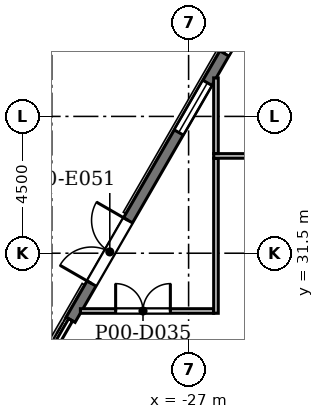
"""IFC4 building model, lengths in metres.
Left out: names, types, materials, properties, quantities, classifications, styles, units other than length and angle.
Written with IfcOpenShell. Run it as: python <this file> out.ifc"""

import sys

from ifc_helpers import new_model, si_unit, direction, frame, frame_2d, origin, place, context, subcontext, project, spatial, rectangle, extrude, element, fill, save


model = new_model("IFC4")
c1 = context("Model", 3, precision=1e-05, world=origin(), true_north=direction((0.0, 1.0)))
c2 = subcontext(c1, "Body", "Model", "MODEL_VIEW")
j1 = project(units=[si_unit("LENGTHUNIT", "METRE"), si_unit("PLANEANGLEUNIT", "RADIAN")], contexts=[c1])
p1 = place(None, origin())
s1 = spatial("IfcSite", under=j1, at=p1, CompositionType="ELEMENT")
p2 = place(p1, origin())
s2 = spatial("IfcBuilding", under=s1, at=p2, CompositionType="ELEMENT")
p3 = place(p2, origin())
s3 = spatial("IfcBuildingStorey", under=s2, at=p3, CompositionType="ELEMENT", Elevation=0.0)
p4 = place(p3, frame((-4.853, 74.393, 0.0), z_axis=(0.0, 0.0, 1.0), x_axis=(-0.499999725439, -0.866025562302, 0.0)))
e1 = element("IfcWall", 1, at=p4, inside=s3, PredefinedType="SOLIDWALL", context=c2, shape_type="SweptSolid", body=[
    extrude(rectangle(XDim=52.058, YDim=0.34, at=frame_2d((26.029, 0.0))), origin(), (0.0, 0.0, 1.0), 7.7),
])
p5 = place(p4, frame((19.058, 0.0, 0.9)))
e2 = element("IfcOpeningElement", 2, at=p5, cuts=e1, PredefinedType="OPENING", context=c2, shape_type="SweptSolid", body=[
    extrude(rectangle(XDim=1.885, YDim=3.5, at=frame_2d((0.942, 1.75))), frame((0.0, 0.18, 0.0), z_axis=(0.0, -1.0, 0.0), x_axis=(1.0, 0.0, 0.0)), (0.0, 0.0, 1.0), 0.36),
])
p6 = place(p4, frame((22.058, 0.0, 0.9)))
e3 = element("IfcOpeningElement", 3, at=p6, cuts=e1, PredefinedType="OPENING", context=c2, shape_type="SweptSolid", body=[
    extrude(rectangle(XDim=1.885, YDim=3.5, at=frame_2d((0.942, 1.75))), frame((0.0, 0.18, 0.0), z_axis=(0.0, -1.0, 0.0), x_axis=(1.0, 0.0, 0.0)), (0.0, 0.0, 1.0), 0.36),
])
p7 = place(p4, frame((40.058, 0.0, 0.9)))
e4 = element("IfcOpeningElement", 4, at=p7, cuts=e1, PredefinedType="OPENING", context=c2, shape_type="SweptSolid", body=[
    extrude(rectangle(XDim=1.885, YDim=3.5, at=frame_2d((0.942, 1.75))), frame((0.0, 0.18, 0.0), z_axis=(0.0, -1.0, 0.0), x_axis=(1.0, 0.0, 0.0)), (0.0, 0.0, 1.0), 0.36),
])
p8 = place(p4, frame((43.058, 0.0, 0.9)))
e5 = element("IfcOpeningElement", 5, at=p8, cuts=e1, PredefinedType="OPENING", context=c2, shape_type="SweptSolid", body=[
    extrude(rectangle(XDim=1.885, YDim=3.5, at=frame_2d((0.942, 1.75))), frame((0.0, 0.18, 0.0), z_axis=(0.0, -1.0, 0.0), x_axis=(1.0, 0.0, 0.0)), (0.0, 0.0, 1.0), 0.36),
])
p9 = place(p4, frame((48.279, 0.0, 0.0)))
e6 = element("IfcOpeningElement", 6, at=p9, cuts=e1, PredefinedType="OPENING", context=c2, shape_type="SweptSolid", body=[
    extrude(rectangle(XDim=2.4, YDim=2.7, at=frame_2d((1.2, 1.35))), frame((0.0, 0.18, 0.0), z_axis=(0.0, -1.0, 0.0), x_axis=(1.0, 0.0, 0.0)), (0.0, 0.0, 1.0), 0.36),
])
p10 = place(p4, frame((36.8, 0.0, 0.0)))
e7 = element("IfcOpeningElement", 7, at=p10, cuts=e1, PredefinedType="OPENING", context=c2, shape_type="SweptSolid", body=[
    extrude(rectangle(XDim=2.4, YDim=2.7, at=frame_2d((1.2, 1.35))), frame((0.0, 0.18, 0.0), z_axis=(0.0, -1.0, 0.0), x_axis=(1.0, 0.0, 0.0)), (0.0, 0.0, 1.0), 0.36),
])
p11 = place(p4, frame((31.06, 0.0, 0.0)))
e8 = element("IfcOpeningElement", 8, at=p11, cuts=e1, PredefinedType="OPENING", context=c2, shape_type="SweptSolid", body=[
    extrude(rectangle(XDim=2.4, YDim=2.7, at=frame_2d((1.2, 1.35))), frame((0.0, 0.18, 0.0), z_axis=(0.0, -1.0, 0.0), x_axis=(1.0, 0.0, 0.0)), (0.0, 0.0, 1.0), 0.36),
])
p12 = place(p4, frame((25.321, 0.0, 0.0)))
e9 = element("IfcOpeningElement", 9, at=p12, cuts=e1, PredefinedType="OPENING", context=c2, shape_type="SweptSolid", body=[
    extrude(rectangle(XDim=2.4, YDim=2.7, at=frame_2d((1.2, 1.35))), frame((0.0, 0.18, 0.0), z_axis=(0.0, -1.0, 0.0), x_axis=(1.0, 0.0, 0.0)), (0.0, 0.0, 1.0), 0.36),
])
p13 = place(p4, frame((13.842, 0.0, 0.0)))
e10 = element("IfcOpeningElement", 10, at=p13, cuts=e1, PredefinedType="OPENING", context=c2, shape_type="SweptSolid", body=[
    extrude(rectangle(XDim=2.4, YDim=2.7, at=frame_2d((1.2, 1.35))), frame((0.0, 0.18, 0.0), z_axis=(0.0, -1.0, 0.0), x_axis=(1.0, 0.0, 0.0)), (0.0, 0.0, 1.0), 0.36),
])
p14 = place(p4, frame((8.102, 0.0, 0.0)))
e11 = element("IfcOpeningElement", 11, at=p14, cuts=e1, PredefinedType="OPENING", context=c2, shape_type="SweptSolid", body=[
    extrude(rectangle(XDim=2.4, YDim=2.7, at=frame_2d((1.2, 1.35))), frame((0.0, 0.18, 0.0), z_axis=(0.0, -1.0, 0.0), x_axis=(1.0, 0.0, 0.0)), (0.0, 0.0, 1.0), 0.36),
])
p15 = place(p4, frame((2.363, 0.0, 0.0)))
e12 = element("IfcOpeningElement", 12, at=p15, cuts=e1, PredefinedType="OPENING", context=c2, shape_type="SweptSolid", body=[
    extrude(rectangle(XDim=2.4, YDim=2.7, at=frame_2d((1.2, 1.35))), frame((0.0, 0.18, 0.0), z_axis=(0.0, -1.0, 0.0), x_axis=(1.0, 0.0, 0.0)), (0.0, 0.0, 1.0), 0.36),
])
p16 = place(p3, frame((-26.175, 29.6, 0.0), z_axis=(0.0, 0.0, 1.0), x_axis=(-1.0, 0.0, 0.0)))
e13 = element("IfcWall", 13, at=p16, inside=s3, PredefinedType="PARTITIONING", context=c2, shape_type="SweptSolid", body=[
    extrude(rectangle(XDim=4.383, YDim=0.15, at=frame_2d((2.191, 0.0))), origin(), (0.0, 0.0, 1.0), 7.7),
])
p17 = place(p16, frame((1.425, 0.0, 0.0)))
e14 = element("IfcOpeningElement", 14, at=p17, cuts=e13, PredefinedType="OPENING", context=c2, shape_type="SweptSolid", body=[
    extrude(rectangle(XDim=1.8, YDim=2.1, at=frame_2d((0.9, 1.05))), frame((0.0, 0.085, 0.0), z_axis=(0.0, -1.0, 0.0), x_axis=(1.0, 0.0, 0.0)), (0.0, 0.0, 1.0), 0.17),
])
p18 = place(p3, frame((-26.1, 34.625, 0.0), z_axis=(0.0, 0.0, 1.0), x_axis=(0.0, -1.0, 0.0)))
e15 = element("IfcWall", 15, at=p18, inside=s3, PredefinedType="PARTITIONING", context=c2, shape_type="SweptSolid", body=[
    extrude(rectangle(XDim=5.1, YDim=0.15, at=frame_2d((2.55, 0.0))), origin(), (0.0, 0.0, 1.0), 7.7),
])
p19 = place(p3, frame((-16.075, 34.7, 0.0), z_axis=(0.0, 0.0, 1.0), x_axis=(-1.0, 0.0, 0.0)))
e16 = element("IfcWall", 16, at=p19, inside=s3, PredefinedType="PARTITIONING", context=c2, shape_type="SweptSolid", body=[
    extrude(rectangle(XDim=10.1, YDim=0.15, at=frame_2d((5.05, 0.0))), origin(), (0.0, 0.0, 1.0), 7.7),
])
p20 = place(p19, frame((3.025, 0.0, 0.0)))
e17 = element("IfcOpeningElement", 17, at=p20, cuts=e16, PredefinedType="OPENING", context=c2, shape_type="SweptSolid", body=[
    extrude(rectangle(XDim=1.8, YDim=2.1, at=frame_2d((0.9, 1.05))), frame((0.0, 0.085, 0.0), z_axis=(0.0, -1.0, 0.0), x_axis=(1.0, 0.0, 0.0)), (0.0, 0.0, 1.0), 0.17),
])
p21 = place(p3, frame((-26.1, 37.267, 0.0), z_axis=(0.0, 0.0, 1.0), x_axis=(0.0, -1.0, 0.0)))
e18 = element("IfcWall", 18, at=p21, inside=s3, PredefinedType="PARTITIONING", context=c2, shape_type="SweptSolid", body=[
    extrude(rectangle(XDim=2.492, YDim=0.15, at=frame_2d((1.246, 0.0))), origin(), (0.0, 0.0, 1.0), 7.7),
])
p22 = place(p7, origin())
e19 = element("IfcWindow", 19, at=p22, inside=s3, PartitioningType="SINGLE_PANEL", PredefinedType="WINDOW", context=c2, shape_type="SweptSolid", body=[
    extrude(rectangle(XDim=1.885, YDim=3.5, at=frame_2d((0.942, 1.75))), frame((0.0, 0.11, 0.0), z_axis=(0.0, -1.0, 0.0), x_axis=(1.0, 0.0, 0.0)), (0.0, 0.0, 1.0), 0.06),
])
fill(e4, e19)
p23 = place(p8, origin())
e20 = element("IfcWindow", 20, at=p23, inside=s3, PartitioningType="SINGLE_PANEL", PredefinedType="WINDOW", context=c2, shape_type="SweptSolid", body=[
    extrude(rectangle(XDim=1.885, YDim=3.5, at=frame_2d((0.942, 1.75))), frame((0.0, 0.11, 0.0), z_axis=(0.0, -1.0, 0.0), x_axis=(1.0, 0.0, 0.0)), (0.0, 0.0, 1.0), 0.06),
])
fill(e5, e20)
p24 = place(p9, frame((2.4, 0.0, 0.0), z_axis=(0.0, 0.0, 1.0), x_axis=(-1.0, 0.0, 0.0)))
e21 = element("IfcDoor", 21, at=p24, inside=s3, OperationType="DOUBLE_DOOR_SINGLE_SWING", PredefinedType="DOOR", context=c2, shape_type="SweptSolid", body=[
    extrude(rectangle(XDim=2.4, YDim=2.7, at=frame_2d((1.2, 1.35))), frame((0.0, 0.025, 0.0), z_axis=(0.0, -1.0, 0.0), x_axis=(1.0, 0.0, 0.0)), (0.0, 0.0, 1.0), 0.05),
])
fill(e6, e21)
p25 = place(p17, frame((1.8, 0.0, 0.0), z_axis=(0.0, 0.0, 1.0), x_axis=(-1.0, 0.0, 0.0)))
e22 = element("IfcDoor", 22, at=p25, inside=s3, OperationType="DOUBLE_DOOR_SINGLE_SWING", PredefinedType="DOOR", context=c2, shape_type="SweptSolid", body=[
    extrude(rectangle(XDim=1.8, YDim=2.1, at=frame_2d((0.9, 1.05))), frame((0.0, 0.025, 0.0), z_axis=(0.0, -1.0, 0.0), x_axis=(1.0, 0.0, 0.0)), (0.0, 0.0, 1.0), 0.05),
])
fill(e14, e22)
save(model, sys.argv[1])
